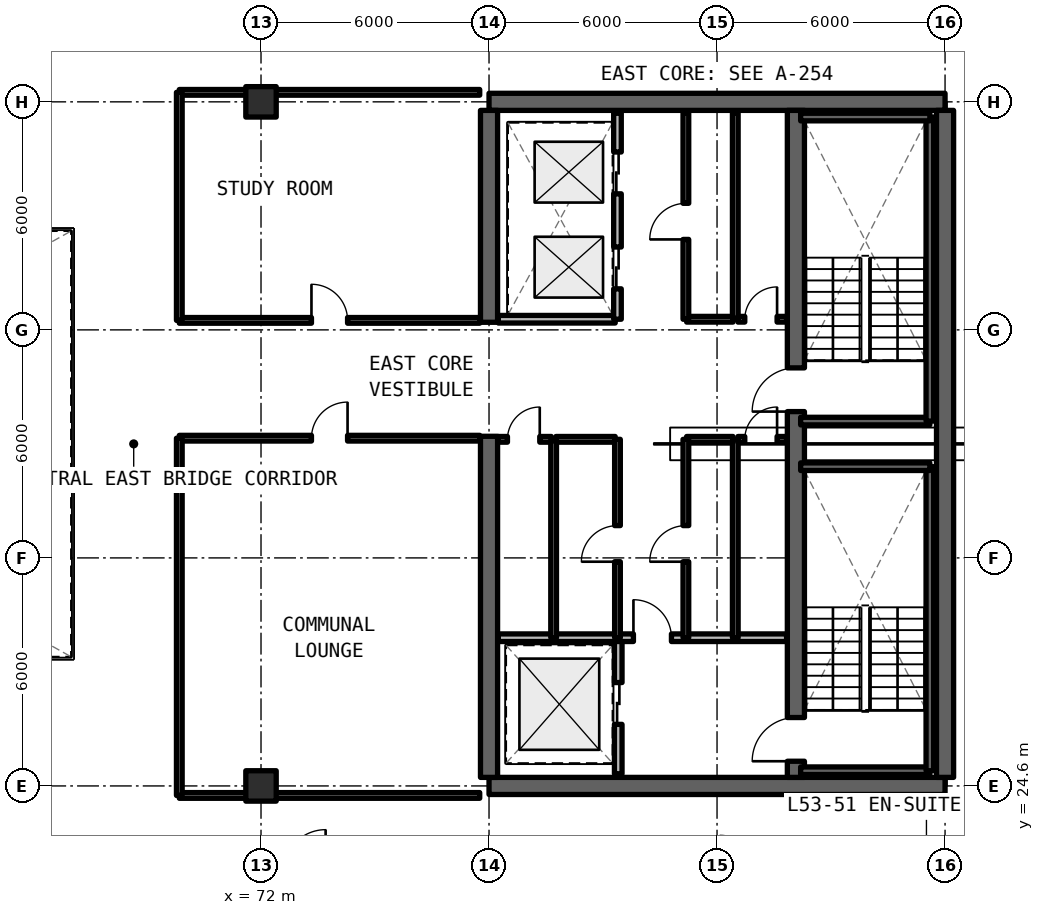
"""IFC4 building model, lengths in metres.
Left out: names, types, materials, properties, quantities, classifications, styles, units other than length and angle.
Written with IfcOpenShell. Run it as: python <this file> out.ifc"""

import sys

from ifc_helpers import new_model, si_unit, direction, frame, frame_2d, origin, origin_2d, place, context, subcontext, project, spatial, rectangle, extrude, element, fill, save


model = new_model("IFC4")
c1 = context("Model", 3, precision=1e-05, world=origin(), true_north=direction((0.0, 1.0)))
c2 = subcontext(c1, "Body", "Model", "MODEL_VIEW")
j1 = project(units=[si_unit("LENGTHUNIT", "METRE"), si_unit("PLANEANGLEUNIT", "RADIAN")], contexts=[c1])
p1 = place(None, origin())
s1 = spatial("IfcSite", under=j1, at=p1, CompositionType="ELEMENT")
p2 = place(p1, origin())
s2 = spatial("IfcBuilding", under=s1, at=p2, CompositionType="ELEMENT")
p3 = place(p2, frame((0.0, 0.0, 191.73)))
s3 = spatial("IfcBuildingStorey", under=s2, at=p3, CompositionType="ELEMENT", Elevation=191.73)
for number, where, z_axis, x_axis in (
    (1, (78.0, 24.6, 0.0), (0.0, 0.0, 1.0), (1.0, 0.0, 0.0)),
    (2, (90.0, 42.6, 0.0), (0.0, 0.0, 1.0), (-1.0, 0.0, 0.0)),
):
    element("IfcWall", number, at=place(p3, frame(where, z_axis=z_axis, x_axis=x_axis)), inside=s3, PredefinedType="SHEAR", context=c2, shape_type="SweptSolid", body=[
        extrude(rectangle(XDim=12.0, YDim=0.45, at=frame_2d((6.0, 0.0))), origin(), (0.0, 0.0, 1.0), 3.3),
    ])
p4 = place(p3, frame((90.0, 24.825, 0.0), z_axis=(0.0, 0.0, 1.0), x_axis=(0.0, 1.0, 0.0)))
e3 = element("IfcWall", 3, at=p4, inside=s3, PredefinedType="SHEAR", context=c2, shape_type="SweptSolid", body=[
    extrude(rectangle(XDim=17.55, YDim=0.45, at=frame_2d((8.775, 0.0))), origin(), (0.0, 0.0, 1.0), 3.3),
])
p5 = place(p3, frame((78.0, 24.825, 0.0), z_axis=(0.0, 0.0, 1.0), x_axis=(0.0, 1.0, 0.0)))
e4 = element("IfcWall", 4, at=p5, inside=s3, PredefinedType="SHEAR", context=c2, shape_type="SweptSolid", body=[
    extrude(rectangle(XDim=8.975, YDim=0.45, at=frame_2d((4.488, 0.0))), origin(), (0.0, 0.0, 1.0), 3.3),
])
p6 = place(p3, frame((78.0, 36.8, 0.0), z_axis=(0.0, 0.0, 1.0), x_axis=(0.0, 1.0, 0.0)))
e5 = element("IfcWall", 5, at=p6, inside=s3, PredefinedType="SHEAR", context=c2, shape_type="SweptSolid", body=[
    extrude(rectangle(XDim=5.575, YDim=0.45, at=frame_2d((2.788, 0.0))), origin(), (0.0, 0.0, 1.0), 3.3),
])
p7 = place(p3, frame((86.075, 24.825, 0.0), z_axis=(0.0, 0.0, 1.0), x_axis=(0.0, 1.0, 0.0)))
e6 = element("IfcWall", 6, at=p7, inside=s3, PredefinedType="SHEAR", context=c2, shape_type="SweptSolid", body=[
    extrude(rectangle(XDim=17.55, YDim=0.45, at=frame_2d((8.775, 0.0))), origin(), (0.0, 0.0, 1.0), 3.3),
])
p8 = place(p7, frame((0.425, 0.0, 0.0)))
e7 = element("IfcOpeningElement", 7, at=p8, cuts=e6, PredefinedType="OPENING", context=c2, shape_type="SweptSolid", body=[
    extrude(rectangle(XDim=1.15, YDim=2.15, at=frame_2d((0.575, 1.075))), frame((0.0, 0.235, 0.0), z_axis=(0.0, -1.0, 0.0), x_axis=(1.0, 0.0, 0.0)), (0.0, 0.0, 1.0), 0.47),
])
p9 = place(p7, frame((9.625, 0.0, 0.0)))
e8 = element("IfcOpeningElement", 8, at=p9, cuts=e6, PredefinedType="OPENING", context=c2, shape_type="SweptSolid", body=[
    extrude(rectangle(XDim=1.15, YDim=2.15, at=frame_2d((0.575, 1.075))), frame((0.0, 0.235, 0.0), z_axis=(0.0, -1.0, 0.0), x_axis=(1.0, 0.0, 0.0)), (0.0, 0.0, 1.0), 0.47),
])
for number, where, z_axis, x_axis in (
    (9, (72.0, 24.6, 0.0), (0.0, 0.0, 1.0), (1.0, 0.0, 0.0)),
    (10, (72.0, 42.6, 0.0), (0.0, 0.0, 1.0), (1.0, 0.0, 0.0)),
):
    element("IfcColumn", number, at=place(p3, frame(where, z_axis=z_axis, x_axis=x_axis)), inside=s3, PredefinedType="COLUMN", context=c2, shape_type="SweptSolid", body=[
        extrude(rectangle(XDim=0.8, YDim=0.8, at=origin_2d()), origin(), (0.0, 0.0, 1.0), 3.3),
    ])
p10 = place(p3, frame((81.4, 24.92, 0.0), z_axis=(0.0, 0.0, 1.0), x_axis=(0.0, 1.0, 0.0)))
e11 = element("IfcWall", 11, at=p10, inside=s3, PredefinedType="SOLIDWALL", context=c2, shape_type="SweptSolid", body=[
    extrude(rectangle(XDim=3.58, YDim=0.2, at=frame_2d((1.79, 0.0))), origin(), (0.0, 0.0, 1.0), 2.35),
])
p11 = place(p10, frame((1.3, 0.0, 0.0)))
e12 = element("IfcOpeningElement", 12, at=p11, cuts=e11, PredefinedType="OPENING", context=c2, shape_type="SweptSolid", body=[
    extrude(rectangle(XDim=1.1, YDim=2.2, at=frame_2d((0.55, 1.1))), frame((0.0, 0.11, 0.0), z_axis=(0.0, -1.0, 0.0), x_axis=(1.0, 0.0, 0.0)), (0.0, 0.0, 1.0), 0.22),
])
p12 = place(p3, frame((78.245, 28.5, 0.0), z_axis=(0.0, 0.0, 1.0), x_axis=(1.0, 0.0, 0.0)))
e13 = element("IfcWall", 13, at=p12, inside=s3, PredefinedType="SOLIDWALL", context=c2, shape_type="SweptSolid", body=[
    extrude(rectangle(XDim=7.585, YDim=0.2, at=frame_2d((3.792, 0.0))), origin(), (0.0, 0.0, 1.0), 2.35),
])
p13 = place(p12, frame((3.555, 0.0, 0.0)))
e14 = element("IfcOpeningElement", 14, at=p13, cuts=e13, PredefinedType="OPENING", context=c2, shape_type="SweptSolid", body=[
    extrude(rectangle(XDim=1.0, YDim=2.15, at=frame_2d((0.5, 1.075))), frame((0.0, 0.11, 0.0), z_axis=(0.0, -1.0, 0.0), x_axis=(1.0, 0.0, 0.0)), (0.0, 0.0, 1.0), 0.22),
])
p14 = place(p3, frame((84.48, 28.5, 0.0), z_axis=(0.0, 0.0, 1.0), x_axis=(0.0, 1.0, 0.0)))
e15 = element("IfcWall", 15, at=p14, inside=s3, PredefinedType="SOLIDWALL", context=c2, shape_type="SweptSolid", body=[
    extrude(rectangle(XDim=5.22, YDim=0.15, at=frame_2d((2.61, 0.0))), origin(), (0.0, 0.0, 1.0), 2.35),
])
p15 = place(p3, frame((84.55, 33.72, 0.0), z_axis=(0.0, 0.0, 1.0), x_axis=(1.0, 0.0, 0.0)))
e16 = element("IfcWall", 16, at=p15, inside=s3, PredefinedType="SOLIDWALL", context=c2, shape_type="SweptSolid", body=[
    extrude(rectangle(XDim=1.28, YDim=0.15, at=frame_2d((0.64, 0.0))), origin(), (0.0, 0.0, 1.0), 2.35),
])
p16 = place(p15, frame((0.18, 0.0, 0.0)))
e17 = element("IfcOpeningElement", 17, at=p16, cuts=e16, PredefinedType="OPENING", context=c2, shape_type="SweptSolid", body=[
    extrude(rectangle(XDim=0.85, YDim=2.1, at=frame_2d((0.425, 1.05))), frame((0.0, 0.085, 0.0), z_axis=(0.0, -1.0, 0.0), x_axis=(1.0, 0.0, 0.0)), (0.0, 0.0, 1.0), 0.17),
])
p17 = place(p3, frame((83.2, 33.72, 0.0), z_axis=(0.0, 0.0, 1.0), x_axis=(1.0, 0.0, 0.0)))
e18 = element("IfcWall", 18, at=p17, inside=s3, PredefinedType="SOLIDWALL", context=c2, shape_type="SweptSolid", body=[
    extrude(rectangle(XDim=1.22, YDim=0.15, at=frame_2d((0.61, 0.0))), origin(), (0.0, 0.0, 1.0), 2.35),
])
p18 = place(p3, frame((83.18, 28.5, 0.0), z_axis=(0.0, 0.0, 1.0), x_axis=(0.0, 1.0, 0.0)))
e19 = element("IfcWall", 19, at=p18, inside=s3, PredefinedType="SOLIDWALL", context=c2, shape_type="SweptSolid", body=[
    extrude(rectangle(XDim=5.22, YDim=0.15, at=frame_2d((2.61, 0.0))), origin(), (0.0, 0.0, 1.0), 2.35),
])
p19 = place(p18, frame((2.0, 0.0, 0.0)))
e20 = element("IfcOpeningElement", 20, at=p19, cuts=e19, PredefinedType="OPENING", context=c2, shape_type="SweptSolid", body=[
    extrude(rectangle(XDim=0.95, YDim=2.15, at=frame_2d((0.475, 1.075))), frame((0.0, 0.085, 0.0), z_axis=(0.0, -1.0, 0.0), x_axis=(1.0, 0.0, 0.0)), (0.0, 0.0, 1.0), 0.17),
])
p20 = place(p3, frame((79.7, 28.5, 0.0), z_axis=(0.0, 0.0, 1.0), x_axis=(0.0, 1.0, 0.0)))
e21 = element("IfcWall", 21, at=p20, inside=s3, PredefinedType="SOLIDWALL", context=c2, shape_type="SweptSolid", body=[
    extrude(rectangle(XDim=5.22, YDim=0.15, at=frame_2d((2.61, 0.0))), origin(), (0.0, 0.0, 1.0), 2.35),
])
p21 = place(p3, frame((79.76, 33.72, 0.0), z_axis=(0.0, 0.0, 1.0), x_axis=(1.0, 0.0, 0.0)))
e22 = element("IfcWall", 22, at=p21, inside=s3, PredefinedType="SOLIDWALL", context=c2, shape_type="SweptSolid", body=[
    extrude(rectangle(XDim=1.56, YDim=0.15, at=frame_2d((0.78, 0.0))), origin(), (0.0, 0.0, 1.0), 2.35),
])
p22 = place(p3, frame((78.245, 33.72, 0.0), z_axis=(0.0, 0.0, 1.0), x_axis=(1.0, 0.0, 0.0)))
e23 = element("IfcWall", 23, at=p22, inside=s3, PredefinedType="SOLIDWALL", context=c2, shape_type="SweptSolid", body=[
    extrude(rectangle(XDim=1.395, YDim=0.15, at=frame_2d((0.697, 0.0))), origin(), (0.0, 0.0, 1.0), 2.35),
])
p23 = place(p22, frame((0.24, 0.0, 0.0)))
e24 = element("IfcOpeningElement", 24, at=p23, cuts=e23, PredefinedType="OPENING", context=c2, shape_type="SweptSolid", body=[
    extrude(rectangle(XDim=0.85, YDim=2.1, at=frame_2d((0.425, 1.05))), frame((0.0, 0.085, 0.0), z_axis=(0.0, -1.0, 0.0), x_axis=(1.0, 0.0, 0.0)), (0.0, 0.0, 1.0), 0.17),
])
p24 = place(p3, frame((81.38, 28.5, 0.0), z_axis=(0.0, 0.0, 1.0), x_axis=(0.0, 1.0, 0.0)))
e25 = element("IfcWall", 25, at=p24, inside=s3, PredefinedType="SOLIDWALL", context=c2, shape_type="SweptSolid", body=[
    extrude(rectangle(XDim=5.22, YDim=0.15, at=frame_2d((2.61, 0.0))), origin(), (0.0, 0.0, 1.0), 2.35),
])
p25 = place(p24, frame((2.0, 0.0, 0.0)))
e26 = element("IfcOpeningElement", 26, at=p25, cuts=e25, PredefinedType="OPENING", context=c2, shape_type="SweptSolid", body=[
    extrude(rectangle(XDim=0.95, YDim=2.15, at=frame_2d((0.475, 1.075))), frame((0.0, 0.085, 0.0), z_axis=(0.0, -1.0, 0.0), x_axis=(1.0, 0.0, 0.0)), (0.0, 0.0, 1.0), 0.17),
])
p26 = place(p3, frame((84.48, 36.88, 0.0), z_axis=(0.0, 0.0, 1.0), x_axis=(0.0, 1.0, 0.0)))
e27 = element("IfcWall", 27, at=p26, inside=s3, PredefinedType="SOLIDWALL", context=c2, shape_type="SweptSolid", body=[
    extrude(rectangle(XDim=5.42, YDim=0.15, at=frame_2d((2.71, 0.0))), origin(), (0.0, 0.0, 1.0), 2.35),
])
p27 = place(p3, frame((84.55, 36.88, 0.0), z_axis=(0.0, 0.0, 1.0), x_axis=(1.0, 0.0, 0.0)))
e28 = element("IfcWall", 28, at=p27, inside=s3, PredefinedType="SOLIDWALL", context=c2, shape_type="SweptSolid", body=[
    extrude(rectangle(XDim=1.28, YDim=0.15, at=frame_2d((0.64, 0.0))), origin(), (0.0, 0.0, 1.0), 2.35),
])
p28 = place(p27, frame((0.18, 0.0, 0.0)))
e29 = element("IfcOpeningElement", 29, at=p28, cuts=e28, PredefinedType="OPENING", context=c2, shape_type="SweptSolid", body=[
    extrude(rectangle(XDim=0.85, YDim=2.1, at=frame_2d((0.425, 1.05))), frame((0.0, 0.085, 0.0), z_axis=(0.0, -1.0, 0.0), x_axis=(1.0, 0.0, 0.0)), (0.0, 0.0, 1.0), 0.17),
])
p29 = place(p3, frame((83.2, 36.88, 0.0), z_axis=(0.0, 0.0, 1.0), x_axis=(1.0, 0.0, 0.0)))
e30 = element("IfcWall", 30, at=p29, inside=s3, PredefinedType="SOLIDWALL", context=c2, shape_type="SweptSolid", body=[
    extrude(rectangle(XDim=1.22, YDim=0.15, at=frame_2d((0.61, 0.0))), origin(), (0.0, 0.0, 1.0), 2.35),
])
p30 = place(p3, frame((83.18, 36.88, 0.0), z_axis=(0.0, 0.0, 1.0), x_axis=(0.0, 1.0, 0.0)))
e31 = element("IfcWall", 31, at=p30, inside=s3, PredefinedType="SOLIDWALL", context=c2, shape_type="SweptSolid", body=[
    extrude(rectangle(XDim=5.42, YDim=0.15, at=frame_2d((2.71, 0.0))), origin(), (0.0, 0.0, 1.0), 2.35),
])
p31 = place(p30, frame((2.1, 0.0, 0.0)))
e32 = element("IfcOpeningElement", 32, at=p31, cuts=e31, PredefinedType="OPENING", context=c2, shape_type="SweptSolid", body=[
    extrude(rectangle(XDim=0.95, YDim=2.15, at=frame_2d((0.475, 1.075))), frame((0.0, 0.085, 0.0), z_axis=(0.0, -1.0, 0.0), x_axis=(1.0, 0.0, 0.0)), (0.0, 0.0, 1.0), 0.17),
])
p32 = place(p3, frame((78.245, 36.88, 0.0), z_axis=(0.0, 0.0, 1.0), x_axis=(1.0, 0.0, 0.0)))
e33 = element("IfcWall", 33, at=p32, inside=s3, PredefinedType="SOLIDWALL", context=c2, shape_type="SweptSolid", body=[
    extrude(rectangle(XDim=3.075, YDim=0.2, at=frame_2d((1.538, 0.0))), origin(), (0.0, 0.0, 1.0), 2.35),
])
p33 = place(p3, frame((81.38, 36.88, 0.0), z_axis=(0.0, 0.0, 1.0), x_axis=(0.0, 1.0, 0.0)))
e34 = element("IfcWall", 34, at=p33, inside=s3, PredefinedType="SOLIDWALL", context=c2, shape_type="SweptSolid", body=[
    extrude(rectangle(XDim=5.42, YDim=0.2, at=frame_2d((2.71, 0.0))), origin(), (0.0, 0.0, 1.0), 2.35),
])
p34 = place(p33, frame((0.8, 0.0, 0.0)))
e35 = element("IfcOpeningElement", 35, at=p34, cuts=e34, PredefinedType="OPENING", context=c2, shape_type="SweptSolid", body=[
    extrude(rectangle(XDim=1.1, YDim=2.2, at=frame_2d((0.55, 1.1))), frame((0.0, 0.11, 0.0), z_axis=(0.0, -1.0, 0.0), x_axis=(1.0, 0.0, 0.0)), (0.0, 0.0, 1.0), 0.22),
])
p35 = place(p33, frame((3.3, 0.0, 0.0)))
e36 = element("IfcOpeningElement", 36, at=p35, cuts=e34, PredefinedType="OPENING", context=c2, shape_type="SweptSolid", body=[
    extrude(rectangle(XDim=1.1, YDim=2.2, at=frame_2d((0.55, 1.1))), frame((0.0, 0.11, 0.0), z_axis=(0.0, -1.0, 0.0), x_axis=(1.0, 0.0, 0.0)), (0.0, 0.0, 1.0), 0.22),
])
p36 = place(p3, frame((69.85, 24.35, 0.0), z_axis=(0.0, 0.0, 1.0), x_axis=(1.0, 0.0, 0.0)))
e37 = element("IfcWall", 37, at=p36, inside=s3, PredefinedType="SOLIDWALL", context=c2, shape_type="SweptSolid", body=[
    extrude(rectangle(XDim=7.905, YDim=0.15, at=frame_2d((3.952, 0.0))), origin(), (0.0, 0.0, 1.0), 2.35),
])
p37 = place(p3, frame((69.85, 33.75, 0.0), z_axis=(0.0, 0.0, 1.0), x_axis=(1.0, 0.0, 0.0)))
e38 = element("IfcWall", 38, at=p37, inside=s3, PredefinedType="SOLIDWALL", context=c2, shape_type="SweptSolid", body=[
    extrude(rectangle(XDim=7.905, YDim=0.15, at=frame_2d((3.952, 0.0))), origin(), (0.0, 0.0, 1.0), 2.35),
])
p38 = place(p37, frame((3.478, 0.0, 0.0)))
e39 = element("IfcOpeningElement", 39, at=p38, cuts=e38, PredefinedType="OPENING", context=c2, shape_type="SweptSolid", body=[
    extrude(rectangle(XDim=0.95, YDim=2.15, at=frame_2d((0.475, 1.075))), frame((0.0, 0.085, 0.0), z_axis=(0.0, -1.0, 0.0), x_axis=(1.0, 0.0, 0.0)), (0.0, 0.0, 1.0), 0.17),
])
p39 = place(p3, frame((69.85, 24.35, 0.0), z_axis=(0.0, 0.0, 1.0), x_axis=(0.0, 1.0, 0.0)))
e40 = element("IfcWall", 40, at=p39, inside=s3, PredefinedType="SOLIDWALL", context=c2, shape_type="SweptSolid", body=[
    extrude(rectangle(XDim=9.4, YDim=0.15, at=frame_2d((4.7, 0.0))), origin(), (0.0, 0.0, 1.0), 2.35),
])
p40 = place(p3, frame((69.85, 36.85, 0.0), z_axis=(0.0, 0.0, 1.0), x_axis=(1.0, 0.0, 0.0)))
e41 = element("IfcWall", 41, at=p40, inside=s3, PredefinedType="SOLIDWALL", context=c2, shape_type="SweptSolid", body=[
    extrude(rectangle(XDim=7.905, YDim=0.15, at=frame_2d((3.952, 0.0))), origin(), (0.0, 0.0, 1.0), 2.35),
])
p41 = place(p40, frame((3.478, 0.0, 0.0)))
e42 = element("IfcOpeningElement", 42, at=p41, cuts=e41, PredefinedType="OPENING", context=c2, shape_type="SweptSolid", body=[
    extrude(rectangle(XDim=0.95, YDim=2.15, at=frame_2d((0.475, 1.075))), frame((0.0, 0.085, 0.0), z_axis=(0.0, -1.0, 0.0), x_axis=(1.0, 0.0, 0.0)), (0.0, 0.0, 1.0), 0.17),
])
p42 = place(p3, frame((69.85, 42.85, 0.0), z_axis=(0.0, 0.0, 1.0), x_axis=(1.0, 0.0, 0.0)))
e43 = element("IfcWall", 43, at=p42, inside=s3, PredefinedType="SOLIDWALL", context=c2, shape_type="SweptSolid", body=[
    extrude(rectangle(XDim=7.905, YDim=0.15, at=frame_2d((3.952, 0.0))), origin(), (0.0, 0.0, 1.0), 2.35),
])
p43 = place(p3, frame((69.85, 36.85, 0.0), z_axis=(0.0, 0.0, 1.0), x_axis=(0.0, 1.0, 0.0)))
e44 = element("IfcWall", 44, at=p43, inside=s3, PredefinedType="SOLIDWALL", context=c2, shape_type="SweptSolid", body=[
    extrude(rectangle(XDim=6.0, YDim=0.15, at=frame_2d((3.0, 0.0))), origin(), (0.0, 0.0, 1.0), 2.35),
])
p44 = place(p3, frame((86.2, 25.0, 0.0), z_axis=(0.0, 0.0, 1.0), x_axis=(1.0, 0.0, 0.0)))
e45 = element("IfcWall", 45, at=p44, inside=s3, PredefinedType="SOLIDWALL", context=c2, shape_type="SweptSolid", body=[
    extrude(rectangle(XDim=3.4, YDim=0.2, at=frame_2d((1.7, 0.0))), origin(), (0.0, 0.0, 1.0), 3.3),
])
p45 = place(p3, frame((89.6, 25.0, 0.0), z_axis=(0.0, 0.0, 1.0), x_axis=(0.0, 1.0, 0.0)))
e46 = element("IfcWall", 46, at=p45, inside=s3, PredefinedType="SOLIDWALL", context=c2, shape_type="SweptSolid", body=[
    extrude(rectangle(XDim=8.0, YDim=0.2, at=frame_2d((4.0, 0.0))), origin(), (0.0, 0.0, 1.0), 3.3),
])
for number, where, z_axis, x_axis in (
    (47, (89.6, 33.0, 0.0), (0.0, 0.0, 1.0), (-1.0, 0.0, 0.0)),
    (48, (86.2, 34.2, 0.0), (0.0, 0.0, 1.0), (1.0, 0.0, 0.0)),
):
    element("IfcWall", number, at=place(p3, frame(where, z_axis=z_axis, x_axis=x_axis)), inside=s3, PredefinedType="SOLIDWALL", context=c2, shape_type="SweptSolid", body=[
        extrude(rectangle(XDim=3.4, YDim=0.2, at=frame_2d((1.7, 0.0))), origin(), (0.0, 0.0, 1.0), 3.3),
    ])
p46 = place(p3, frame((89.6, 34.2, 0.0), z_axis=(0.0, 0.0, 1.0), x_axis=(0.0, 1.0, 0.0)))
e49 = element("IfcWall", 49, at=p46, inside=s3, PredefinedType="SOLIDWALL", context=c2, shape_type="SweptSolid", body=[
    extrude(rectangle(XDim=8.0, YDim=0.2, at=frame_2d((4.0, 0.0))), origin(), (0.0, 0.0, 1.0), 3.3),
])
p47 = place(p3, frame((89.6, 42.2, 0.0), z_axis=(0.0, 0.0, 1.0), x_axis=(-1.0, 0.0, 0.0)))
e50 = element("IfcWall", 50, at=p47, inside=s3, PredefinedType="SOLIDWALL", context=c2, shape_type="SweptSolid", body=[
    extrude(rectangle(XDim=3.4, YDim=0.2, at=frame_2d((1.7, 0.0))), origin(), (0.0, 0.0, 1.0), 3.3),
])
p48 = place(p11, origin())
e51 = element("IfcDoor", 51, at=p48, inside=s3, OperationType="SLIDING_TO_LEFT", PredefinedType="DOOR", context=c2, shape_type="SweptSolid", body=[
    extrude(rectangle(XDim=1.1, YDim=2.2, at=frame_2d((0.55, 1.1))), frame((0.0, 0.025, 0.0), z_axis=(0.0, -1.0, 0.0), x_axis=(1.0, 0.0, 0.0)), (0.0, 0.0, 1.0), 0.05),
])
fill(e12, e51)
p49 = place(p13, origin())
e52 = element("IfcDoor", 52, at=p49, inside=s3, OperationType="SINGLE_SWING_LEFT", PredefinedType="DOOR", context=c2, shape_type="SweptSolid", body=[
    extrude(rectangle(XDim=1.0, YDim=2.15, at=frame_2d((0.5, 1.075))), frame((0.0, 0.025, 0.0), z_axis=(0.0, -1.0, 0.0), x_axis=(1.0, 0.0, 0.0)), (0.0, 0.0, 1.0), 0.05),
])
fill(e14, e52)
p50 = place(p16, origin())
e53 = element("IfcDoor", 53, at=p50, inside=s3, OperationType="SINGLE_SWING_RIGHT", PredefinedType="DOOR", context=c2, shape_type="SweptSolid", body=[
    extrude(rectangle(XDim=0.85, YDim=2.1, at=frame_2d((0.425, 1.05))), frame((0.0, 0.025, 0.0), z_axis=(0.0, -1.0, 0.0), x_axis=(1.0, 0.0, 0.0)), (0.0, 0.0, 1.0), 0.05),
])
fill(e17, e53)
p51 = place(p19, origin())
e54 = element("IfcDoor", 54, at=p51, inside=s3, OperationType="SINGLE_SWING_LEFT", PredefinedType="DOOR", context=c2, shape_type="SweptSolid", body=[
    extrude(rectangle(XDim=0.95, YDim=2.15, at=frame_2d((0.475, 1.075))), frame((0.0, 0.025, 0.0), z_axis=(0.0, -1.0, 0.0), x_axis=(1.0, 0.0, 0.0)), (0.0, 0.0, 1.0), 0.05),
])
fill(e20, e54)
p52 = place(p23, origin())
e55 = element("IfcDoor", 55, at=p52, inside=s3, OperationType="SINGLE_SWING_RIGHT", PredefinedType="DOOR", context=c2, shape_type="SweptSolid", body=[
    extrude(rectangle(XDim=0.85, YDim=2.1, at=frame_2d((0.425, 1.05))), frame((0.0, 0.025, 0.0), z_axis=(0.0, -1.0, 0.0), x_axis=(1.0, 0.0, 0.0)), (0.0, 0.0, 1.0), 0.05),
])
fill(e24, e55)
p53 = place(p25, origin())
e56 = element("IfcDoor", 56, at=p53, inside=s3, OperationType="SINGLE_SWING_LEFT", PredefinedType="DOOR", context=c2, shape_type="SweptSolid", body=[
    extrude(rectangle(XDim=0.95, YDim=2.15, at=frame_2d((0.475, 1.075))), frame((0.0, 0.025, 0.0), z_axis=(0.0, -1.0, 0.0), x_axis=(1.0, 0.0, 0.0)), (0.0, 0.0, 1.0), 0.05),
])
fill(e26, e56)
p54 = place(p28, origin())
e57 = element("IfcDoor", 57, at=p54, inside=s3, OperationType="SINGLE_SWING_RIGHT", PredefinedType="DOOR", context=c2, shape_type="SweptSolid", body=[
    extrude(rectangle(XDim=0.85, YDim=2.1, at=frame_2d((0.425, 1.05))), frame((0.0, 0.025, 0.0), z_axis=(0.0, -1.0, 0.0), x_axis=(1.0, 0.0, 0.0)), (0.0, 0.0, 1.0), 0.05),
])
fill(e29, e57)
p55 = place(p31, origin())
e58 = element("IfcDoor", 58, at=p55, inside=s3, OperationType="SINGLE_SWING_LEFT", PredefinedType="DOOR", context=c2, shape_type="SweptSolid", body=[
    extrude(rectangle(XDim=0.95, YDim=2.15, at=frame_2d((0.475, 1.075))), frame((0.0, 0.025, 0.0), z_axis=(0.0, -1.0, 0.0), x_axis=(1.0, 0.0, 0.0)), (0.0, 0.0, 1.0), 0.05),
])
fill(e32, e58)
p56 = place(p34, origin())
e59 = element("IfcDoor", 59, at=p56, inside=s3, OperationType="SLIDING_TO_LEFT", PredefinedType="DOOR", context=c2, shape_type="SweptSolid", body=[
    extrude(rectangle(XDim=1.1, YDim=2.2, at=frame_2d((0.55, 1.1))), frame((0.0, 0.025, 0.0), z_axis=(0.0, -1.0, 0.0), x_axis=(1.0, 0.0, 0.0)), (0.0, 0.0, 1.0), 0.05),
])
fill(e35, e59)
p57 = place(p35, origin())
e60 = element("IfcDoor", 60, at=p57, inside=s3, OperationType="SLIDING_TO_RIGHT", PredefinedType="DOOR", context=c2, shape_type="SweptSolid", body=[
    extrude(rectangle(XDim=1.1, YDim=2.2, at=frame_2d((0.55, 1.1))), frame((0.0, 0.025, 0.0), z_axis=(0.0, -1.0, 0.0), x_axis=(1.0, 0.0, 0.0)), (0.0, 0.0, 1.0), 0.05),
])
fill(e36, e60)
p58 = place(p38, origin())
e61 = element("IfcDoor", 61, at=p58, inside=s3, OperationType="SINGLE_SWING_RIGHT", PredefinedType="DOOR", context=c2, shape_type="SweptSolid", body=[
    extrude(rectangle(XDim=0.95, YDim=2.15, at=frame_2d((0.475, 1.075))), frame((0.0, 0.025, 0.0), z_axis=(0.0, -1.0, 0.0), x_axis=(1.0, 0.0, 0.0)), (0.0, 0.0, 1.0), 0.05),
])
fill(e39, e61)
p59 = place(p41, origin())
e62 = element("IfcDoor", 62, at=p59, inside=s3, OperationType="SINGLE_SWING_LEFT", PredefinedType="DOOR", context=c2, shape_type="SweptSolid", body=[
    extrude(rectangle(XDim=0.95, YDim=2.15, at=frame_2d((0.475, 1.075))), frame((0.0, 0.025, 0.0), z_axis=(0.0, -1.0, 0.0), x_axis=(1.0, 0.0, 0.0)), (0.0, 0.0, 1.0), 0.05),
])
fill(e42, e62)
p60 = place(p8, origin())
e63 = element("IfcDoor", 63, at=p60, inside=s3, OperationType="SINGLE_SWING_RIGHT", PredefinedType="DOOR", context=c2, shape_type="SweptSolid", body=[
    extrude(rectangle(XDim=1.15, YDim=2.15, at=frame_2d((0.575, 1.075))), frame((0.0, 0.025, 0.0), z_axis=(0.0, -1.0, 0.0), x_axis=(1.0, 0.0, 0.0)), (0.0, 0.0, 1.0), 0.05),
])
fill(e7, e63)
p61 = place(p9, origin())
e64 = element("IfcDoor", 64, at=p61, inside=s3, OperationType="SINGLE_SWING_LEFT", PredefinedType="DOOR", context=c2, shape_type="SweptSolid", body=[
    extrude(rectangle(XDim=1.15, YDim=2.15, at=frame_2d((0.575, 1.075))), frame((0.0, 0.025, 0.0), z_axis=(0.0, -1.0, 0.0), x_axis=(1.0, 0.0, 0.0)), (0.0, 0.0, 1.0), 0.05),
])
fill(e8, e64)
save(model, sys.argv[1])
